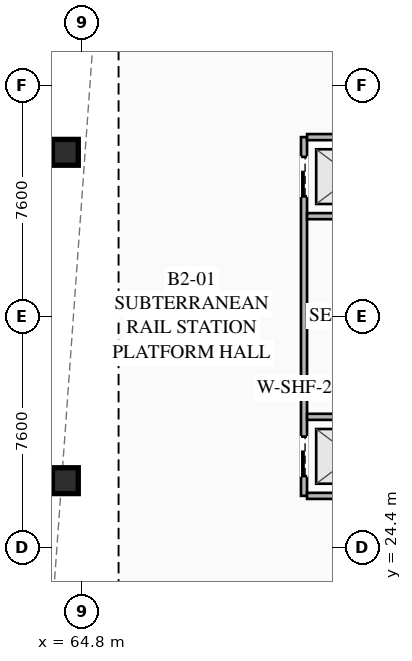
"""IFC4 building model, lengths in metres.
Left out: names, types, materials, properties, quantities, classifications, styles, units other than length and angle.
Written with IfcOpenShell. Run it as: python <this file> out.ifc"""

import sys

from ifc_helpers import new_model, si_unit, direction, frame, frame_2d, origin, origin_2d, place, context, subcontext, project, spatial, rectangle, hollow_rectangle, extrude, element, fill, save


model = new_model("IFC4")
c1 = context("Model", 3, precision=1e-05, world=origin(), true_north=direction((0.0, 1.0)))
c2 = subcontext(c1, "Body", "Model", "MODEL_VIEW")
j1 = project(units=[si_unit("LENGTHUNIT", "METRE"), si_unit("PLANEANGLEUNIT", "RADIAN")], contexts=[c1])
p1 = place(None, origin())
s1 = spatial("IfcSite", under=j1, at=p1, CompositionType="ELEMENT")
p2 = place(p1, origin())
s2 = spatial("IfcBuilding", under=s1, at=p2, CompositionType="ELEMENT")
p3 = place(p2, frame((0.0, 0.0, -11.0)))
s3 = spatial("IfcBuildingStorey", under=s2, at=p3, CompositionType="ELEMENT", Elevation=-11.0)
for number, where, z_axis, x_axis in (
    (1, (64.25, 26.6, 0.0), (0.0, 0.0, 1.0), (1.0, 0.0, 0.0)),
    (2, (64.25, 37.4, 0.0), (0.0, 0.0, 1.0), (1.0, 0.0, 0.0)),
):
    element("IfcColumn", number, at=place(p3, frame(where, z_axis=z_axis, x_axis=x_axis)), inside=s3, PredefinedType="COLUMN", context=c2, shape_type="SweptSolid", body=[
        extrude(hollow_rectangle(XDim=0.85, YDim=0.85, WallThickness=0.035, at=origin_2d()), origin(), (0.0, 0.0, 1.0), 5.24),
    ])
p4 = place(p3, frame((72.1, 26.1, 0.0), z_axis=(0.0, 0.0, 1.0), x_axis=(0.0, 1.0, 0.0)))
e3 = element("IfcWall", 3, at=p4, inside=s3, PredefinedType="SOLIDWALL", context=c2, shape_type="SweptSolid", body=[
    extrude(rectangle(XDim=11.8, YDim=0.2, at=frame_2d((5.9, 0.0))), origin(), (0.0, 0.0, 1.0), 4.283),
])
p5 = place(p4, frame((0.65, 0.0, 0.0)))
e4 = element("IfcOpeningElement", 4, at=p5, cuts=e3, PredefinedType="OPENING", context=c2, shape_type="SweptSolid", body=[
    extrude(rectangle(XDim=1.3, YDim=2.25, at=frame_2d((0.65, 1.125))), frame((0.0, 0.11, 0.0), z_axis=(0.0, -1.0, 0.0), x_axis=(1.0, 0.0, 0.0)), (0.0, 0.0, 1.0), 0.22),
])
p6 = place(p4, frame((9.85, 0.0, 0.0)))
e5 = element("IfcOpeningElement", 5, at=p6, cuts=e3, PredefinedType="OPENING", context=c2, shape_type="SweptSolid", body=[
    extrude(rectangle(XDim=1.3, YDim=2.25, at=frame_2d((0.65, 1.125))), frame((0.0, 0.11, 0.0), z_axis=(0.0, -1.0, 0.0), x_axis=(1.0, 0.0, 0.0)), (0.0, 0.0, 1.0), 0.22),
])
for number, where, z_axis, x_axis in (
    (6, (72.2, 26.1, 0.0), (0.0, 0.0, 1.0), (1.0, 0.0, 0.0)),
    (7, (72.2, 28.7, 0.0), (0.0, 0.0, 1.0), (1.0, 0.0, 0.0)),
    (8, (72.2, 35.3, 0.0), (0.0, 0.0, 1.0), (1.0, 0.0, 0.0)),
    (9, (72.2, 37.9, 0.0), (0.0, 0.0, 1.0), (1.0, 0.0, 0.0)),
):
    element("IfcWall", number, at=place(p3, frame(where, z_axis=z_axis, x_axis=x_axis)), inside=s3, PredefinedType="SOLIDWALL", context=c2, shape_type="SweptSolid", body=[
        extrude(rectangle(XDim=3.0, YDim=0.2, at=frame_2d((1.5, 0.0))), origin(), (0.0, 0.0, 1.0), 4.283),
    ])
p7 = place(p5, origin())
e10 = element("IfcDoor", 10, at=p7, inside=s3, OperationType="SLIDING_TO_LEFT", PredefinedType="DOOR", context=c2, shape_type="SweptSolid", body=[
    extrude(rectangle(XDim=1.3, YDim=2.25, at=frame_2d((0.65, 1.125))), frame((0.0, 0.025, 0.0), z_axis=(0.0, -1.0, 0.0), x_axis=(1.0, 0.0, 0.0)), (0.0, 0.0, 1.0), 0.05),
])
fill(e4, e10)
p8 = place(p6, origin())
e11 = element("IfcDoor", 11, at=p8, inside=s3, OperationType="SLIDING_TO_LEFT", PredefinedType="DOOR", context=c2, shape_type="SweptSolid", body=[
    extrude(rectangle(XDim=1.3, YDim=2.25, at=frame_2d((0.65, 1.125))), frame((0.0, 0.025, 0.0), z_axis=(0.0, -1.0, 0.0), x_axis=(1.0, 0.0, 0.0)), (0.0, 0.0, 1.0), 0.05),
])
fill(e5, e11)
save(model, sys.argv[1])
